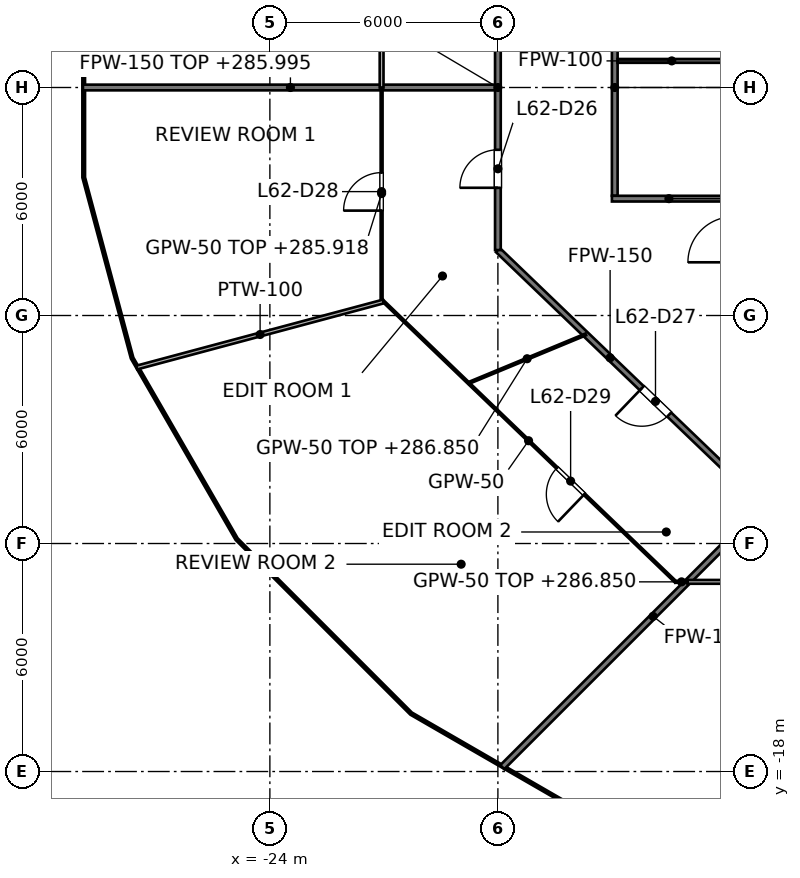
"""IFC4 building model, lengths in metres.
Left out: names, types, materials, properties, quantities, classifications, styles, units other than length and angle.
Written with IfcOpenShell. Run it as: python <this file> out.ifc"""

import sys

from ifc_helpers import new_model, si_unit, direction, frame, frame_2d, origin, place, context, subcontext, project, spatial, rectangle, extrude, element, fill, save


model = new_model("IFC4")
c1 = context("Model", 3, precision=1e-05, world=origin(), true_north=direction((0.0, 1.0)))
c2 = subcontext(c1, "Body", "Model", "MODEL_VIEW")
j1 = project(units=[si_unit("LENGTHUNIT", "METRE"), si_unit("PLANEANGLEUNIT", "RADIAN")], contexts=[c1])
p1 = place(None, origin())
s1 = spatial("IfcSite", under=j1, at=p1, CompositionType="ELEMENT")
p2 = place(p1, origin())
s2 = spatial("IfcBuilding", under=s1, at=p2, CompositionType="ELEMENT")
p3 = place(p2, frame((0.0, 0.0, 283.0)))
s3 = spatial("IfcBuildingStorey", under=s2, at=p3, CompositionType="ELEMENT", Elevation=283.0)
p4 = place(p3, frame((-14.925, -2.85, 0.0), z_axis=(0.0, 0.0, 1.0), x_axis=(0.0, 1.0, 0.0)))
e1 = element("IfcWall", 1, at=p4, inside=s3, PredefinedType="PARTITIONING", context=c2, shape_type="SweptSolid", body=[
    extrude(rectangle(XDim=5.7, YDim=0.15, at=frame_2d((2.85, 0.0))), origin(), (0.0, 0.0, 1.0), 2.918),
])
p5 = place(p3, frame((-15.0, -2.925, 0.0), z_axis=(0.0, 0.0, 1.0), x_axis=(1.0, 0.0, 0.0)))
e2 = element("IfcWall", 2, at=p5, inside=s3, PredefinedType="PARTITIONING", context=c2, shape_type="SweptSolid", body=[
    extrude(rectangle(XDim=3.0, YDim=0.15, at=frame_2d((1.5, 0.0))), origin(), (0.0, 0.0, 1.0), 3.85),
])
p6 = place(p3, frame((-14.85, 0.7, 0.0), z_axis=(0.0, 0.0, 1.0), x_axis=(1.0, 0.0, 0.0)))
e3 = element("IfcWall", 3, at=p6, inside=s3, PredefinedType="PARTITIONING", context=c2, shape_type="SweptSolid", body=[
    extrude(rectangle(XDim=2.85, YDim=0.1, at=frame_2d((1.425, 0.0))), origin(), (0.0, 0.0, 1.0), 3.85),
])
p7 = place(p3, frame((-18.0, -4.278, 0.0), z_axis=(0.0, 0.0, 1.0), x_axis=(0.721290181137, -0.692633001376, 0.0)))
e4 = element("IfcWall", 4, at=p7, inside=s3, PredefinedType="PARTITIONING", context=c2, shape_type="SweptSolid", body=[
    extrude(rectangle(XDim=8.187, YDim=0.15, at=frame_2d((4.094, 0.0))), origin(), (0.0, 0.0, 1.0), 2.927),
])
p8 = place(p7, frame((5.249, 0.0, 0.0)))
e5 = element("IfcOpeningElement", 5, at=p8, cuts=e4, PredefinedType="OPENING", context=c2, shape_type="SweptSolid", body=[
    extrude(rectangle(XDim=1.0, YDim=2.1, at=frame_2d((0.5, 1.05))), frame((0.0, 0.075, 0.0), z_axis=(0.0, -1.0, 0.0), x_axis=(1.0, 0.0, 0.0)), (0.0, 0.0, 1.0), 0.15),
])
p9 = place(p3, frame((-28.919, 0.0, 0.0), z_axis=(0.0, 0.0, 1.0), x_axis=(1.0, 0.0, 0.0)))
e6 = element("IfcWall", 6, at=p9, inside=s3, PredefinedType="PARTITIONING", context=c2, shape_type="SweptSolid", body=[
    extrude(rectangle(XDim=10.919, YDim=0.15, at=frame_2d((5.459, 0.0))), origin(), (0.0, 0.0, 1.0), 2.995),
])
p10 = place(p3, frame((-17.884, -17.884, 0.0), z_axis=(0.0, 0.0, 1.0), x_axis=(0.707106781187, 0.707106781187, 0.0)))
e7 = element("IfcWall", 7, at=p10, inside=s3, PredefinedType="PARTITIONING", context=c2, shape_type="SweptSolid", body=[
    extrude(rectangle(XDim=11.222, YDim=0.15, at=frame_2d((5.611, 0.0))), origin(), (0.0, 0.0, 1.0), 3.424),
])
p11 = place(p3, frame((-18.0, -4.278, 0.0), z_axis=(0.0, 0.0, 1.0), x_axis=(0.0, 1.0, 0.0)))
e8 = element("IfcWall", 8, at=p11, inside=s3, PredefinedType="PARTITIONING", context=c2, shape_type="SweptSolid", body=[
    extrude(rectangle(XDim=8.556, YDim=0.15, at=frame_2d((4.278, 0.0))), origin(), (0.0, 0.0, 1.0), 2.918),
])
p12 = place(p11, frame((1.639, 0.0, 0.0)))
e9 = element("IfcOpeningElement", 9, at=p12, cuts=e8, PredefinedType="OPENING", context=c2, shape_type="SweptSolid", body=[
    extrude(rectangle(XDim=1.0, YDim=2.1, at=frame_2d((0.5, 1.05))), frame((0.0, 0.075, 0.0), z_axis=(0.0, -1.0, 0.0), x_axis=(1.0, 0.0, 0.0)), (0.0, 0.0, 1.0), 0.15),
])
p13 = place(p3, frame((-21.06, -5.582, 0.0), z_axis=(0.0, 0.0, 1.0), x_axis=(0.72130541771, -0.692617134051, 0.0)))
e10 = element("IfcWall", 10, at=p13, inside=s3, PredefinedType="PARTITIONING", context=c2, shape_type="SweptSolid", body=[
    extrude(rectangle(XDim=10.723, YDim=0.05, at=frame_2d((5.361, 0.0))), origin(), (0.0, 0.0, 1.0), 2.927),
])
p14 = place(p13, frame((6.395, 0.0, 0.0)))
e11 = element("IfcOpeningElement", 11, at=p14, cuts=e10, PredefinedType="OPENING", context=c2, shape_type="SweptSolid", body=[
    extrude(rectangle(XDim=1.0, YDim=2.1, at=frame_2d((0.5, 1.05))), frame((0.0, 0.025, 0.0), z_axis=(0.0, -1.0, 0.0), x_axis=(1.0, 0.0, 0.0)), (0.0, 0.0, 1.0), 0.05),
])
p15 = place(p3, frame((-13.326, -13.009, 0.0), z_axis=(0.0, 0.0, 1.0), x_axis=(1.0, 0.0, 0.0)))
e12 = element("IfcWall", 12, at=p15, inside=s3, PredefinedType="PARTITIONING", context=c2, shape_type="SweptSolid", body=[
    extrude(rectangle(XDim=0.317, YDim=0.05, at=frame_2d((0.158, 0.0))), origin(), (0.0, 0.0, 1.0), 3.85),
])
p16 = place(p3, frame((-18.774, -7.777, 0.0), z_axis=(0.0, 0.0, 1.0), x_axis=(0.92379319059, 0.382891813727, 0.0)))
e13 = element("IfcWall", 13, at=p16, inside=s3, PredefinedType="PARTITIONING", context=c2, shape_type="SweptSolid", body=[
    extrude(rectangle(XDim=3.341, YDim=0.05, at=frame_2d((1.67, 0.0))), origin(), (0.0, 0.0, 1.0), 3.85),
])
p17 = place(p3, frame((-21.06, -5.582, 0.0), z_axis=(0.0, 0.0, 1.0), x_axis=(0.0, 1.0, 0.0)))
e14 = element("IfcWall", 14, at=p17, inside=s3, PredefinedType="PARTITIONING", context=c2, shape_type="SweptSolid", body=[
    extrude(rectangle(XDim=5.582, YDim=0.05, at=frame_2d((2.791, 0.0))), origin(), (0.0, 0.0, 1.0), 2.918),
])
p18 = place(p17, frame((2.342, 0.0, 0.0)))
e15 = element("IfcOpeningElement", 15, at=p18, cuts=e14, PredefinedType="OPENING", context=c2, shape_type="SweptSolid", body=[
    extrude(rectangle(XDim=1.0, YDim=2.1, at=frame_2d((0.5, 1.05))), frame((0.0, 0.025, 0.0), z_axis=(0.0, -1.0, 0.0), x_axis=(1.0, 0.0, 0.0)), (0.0, 0.0, 1.0), 0.05),
])
p19 = place(p3, frame((-13.009, -13.009, 0.0), z_axis=(0.0, 0.0, 1.0), x_axis=(1.0, 0.0, 0.0)))
e16 = element("IfcWall", 16, at=p19, inside=s3, PredefinedType="PARTITIONING", context=c2, shape_type="SweptSolid", body=[
    extrude(rectangle(XDim=26.335, YDim=0.1, at=frame_2d((13.167, 0.0))), origin(), (0.0, 0.0, 1.0), 2.927),
])
p20 = place(p19, frame((18.822, 0.0, 0.0)))
e17 = element("IfcOpeningElement", 17, at=p20, cuts=e16, PredefinedType="OPENING", context=c2, shape_type="SweptSolid", body=[
    extrude(rectangle(XDim=1.8, YDim=2.1, at=frame_2d((0.9, 1.05))), frame((0.0, 0.05, 0.0), z_axis=(0.0, -1.0, 0.0), x_axis=(1.0, 0.0, 0.0)), (0.0, 0.0, 1.0), 0.1),
])
p21 = place(p19, frame((9.195, 0.0, 0.0)))
e18 = element("IfcOpeningElement", 18, at=p21, cuts=e16, PredefinedType="OPENING", context=c2, shape_type="SweptSolid", body=[
    extrude(rectangle(XDim=0.9, YDim=2.1, at=frame_2d((0.45, 1.05))), frame((0.0, 0.05, 0.0), z_axis=(0.0, -1.0, 0.0), x_axis=(1.0, 0.0, 0.0)), (0.0, 0.0, 1.0), 0.1),
])
p22 = place(p3, frame((-27.504, -7.37, 0.0), z_axis=(0.0, 0.0, 1.0), x_axis=(0.965918386672, 0.258846808534, 0.0)))
e19 = element("IfcWall", 19, at=p22, inside=s3, PredefinedType="PARTITIONING", context=c2, shape_type="SweptSolid", body=[
    extrude(rectangle(XDim=6.723, YDim=0.1, at=frame_2d((3.362, 0.0))), origin(), (0.0, 0.0, 1.0), 2.927),
])
p23 = place(p3, frame((-21.06, 0.0, 0.0), z_axis=(0.0, 0.0, 1.0), x_axis=(0.0, 1.0, 0.0)))
e20 = element("IfcWall", 20, at=p23, inside=s3, PredefinedType="PARTITIONING", context=c2, shape_type="SweptSolid", body=[
    extrude(rectangle(XDim=5.582, YDim=0.1, at=frame_2d((2.791, 0.0))), origin(), (0.0, 0.0, 1.0), 2.918),
])
p24 = place(p12, origin())
e21 = element("IfcDoor", 21, at=p24, inside=s3, OperationType="SINGLE_SWING_LEFT", PredefinedType="DOOR", context=c2, shape_type="SweptSolid", body=[
    extrude(rectangle(XDim=1.0, YDim=2.1, at=frame_2d((0.5, 1.05))), frame((0.0, 0.025, 0.0), z_axis=(0.0, -1.0, 0.0), x_axis=(1.0, 0.0, 0.0)), (0.0, 0.0, 1.0), 0.05),
])
fill(e9, e21)
p25 = place(p8, origin())
e22 = element("IfcDoor", 22, at=p25, inside=s3, OperationType="SINGLE_SWING_LEFT", PredefinedType="DOOR", context=c2, shape_type="SweptSolid", body=[
    extrude(rectangle(XDim=1.0, YDim=2.1, at=frame_2d((0.5, 1.05))), frame((0.0, 0.025, 0.0), z_axis=(0.0, -1.0, 0.0), x_axis=(1.0, 0.0, 0.0)), (0.0, 0.0, 1.0), 0.05),
])
fill(e5, e22)
p26 = place(p18, origin())
e23 = element("IfcDoor", 23, at=p26, inside=s3, OperationType="SINGLE_SWING_LEFT", PredefinedType="DOOR", context=c2, shape_type="SweptSolid", body=[
    extrude(rectangle(XDim=1.0, YDim=2.1, at=frame_2d((0.5, 1.05))), frame((0.0, 0.025, 0.0), z_axis=(0.0, -1.0, 0.0), x_axis=(1.0, 0.0, 0.0)), (0.0, 0.0, 1.0), 0.05),
])
fill(e15, e23)
p27 = place(p14, origin())
e24 = element("IfcDoor", 24, at=p27, inside=s3, OperationType="SINGLE_SWING_RIGHT", PredefinedType="DOOR", context=c2, shape_type="SweptSolid", body=[
    extrude(rectangle(XDim=1.0, YDim=2.1, at=frame_2d((0.5, 1.05))), frame((0.0, 0.025, 0.0), z_axis=(0.0, -1.0, 0.0), x_axis=(1.0, 0.0, 0.0)), (0.0, 0.0, 1.0), 0.05),
])
fill(e11, e24)
save(model, sys.argv[1])
